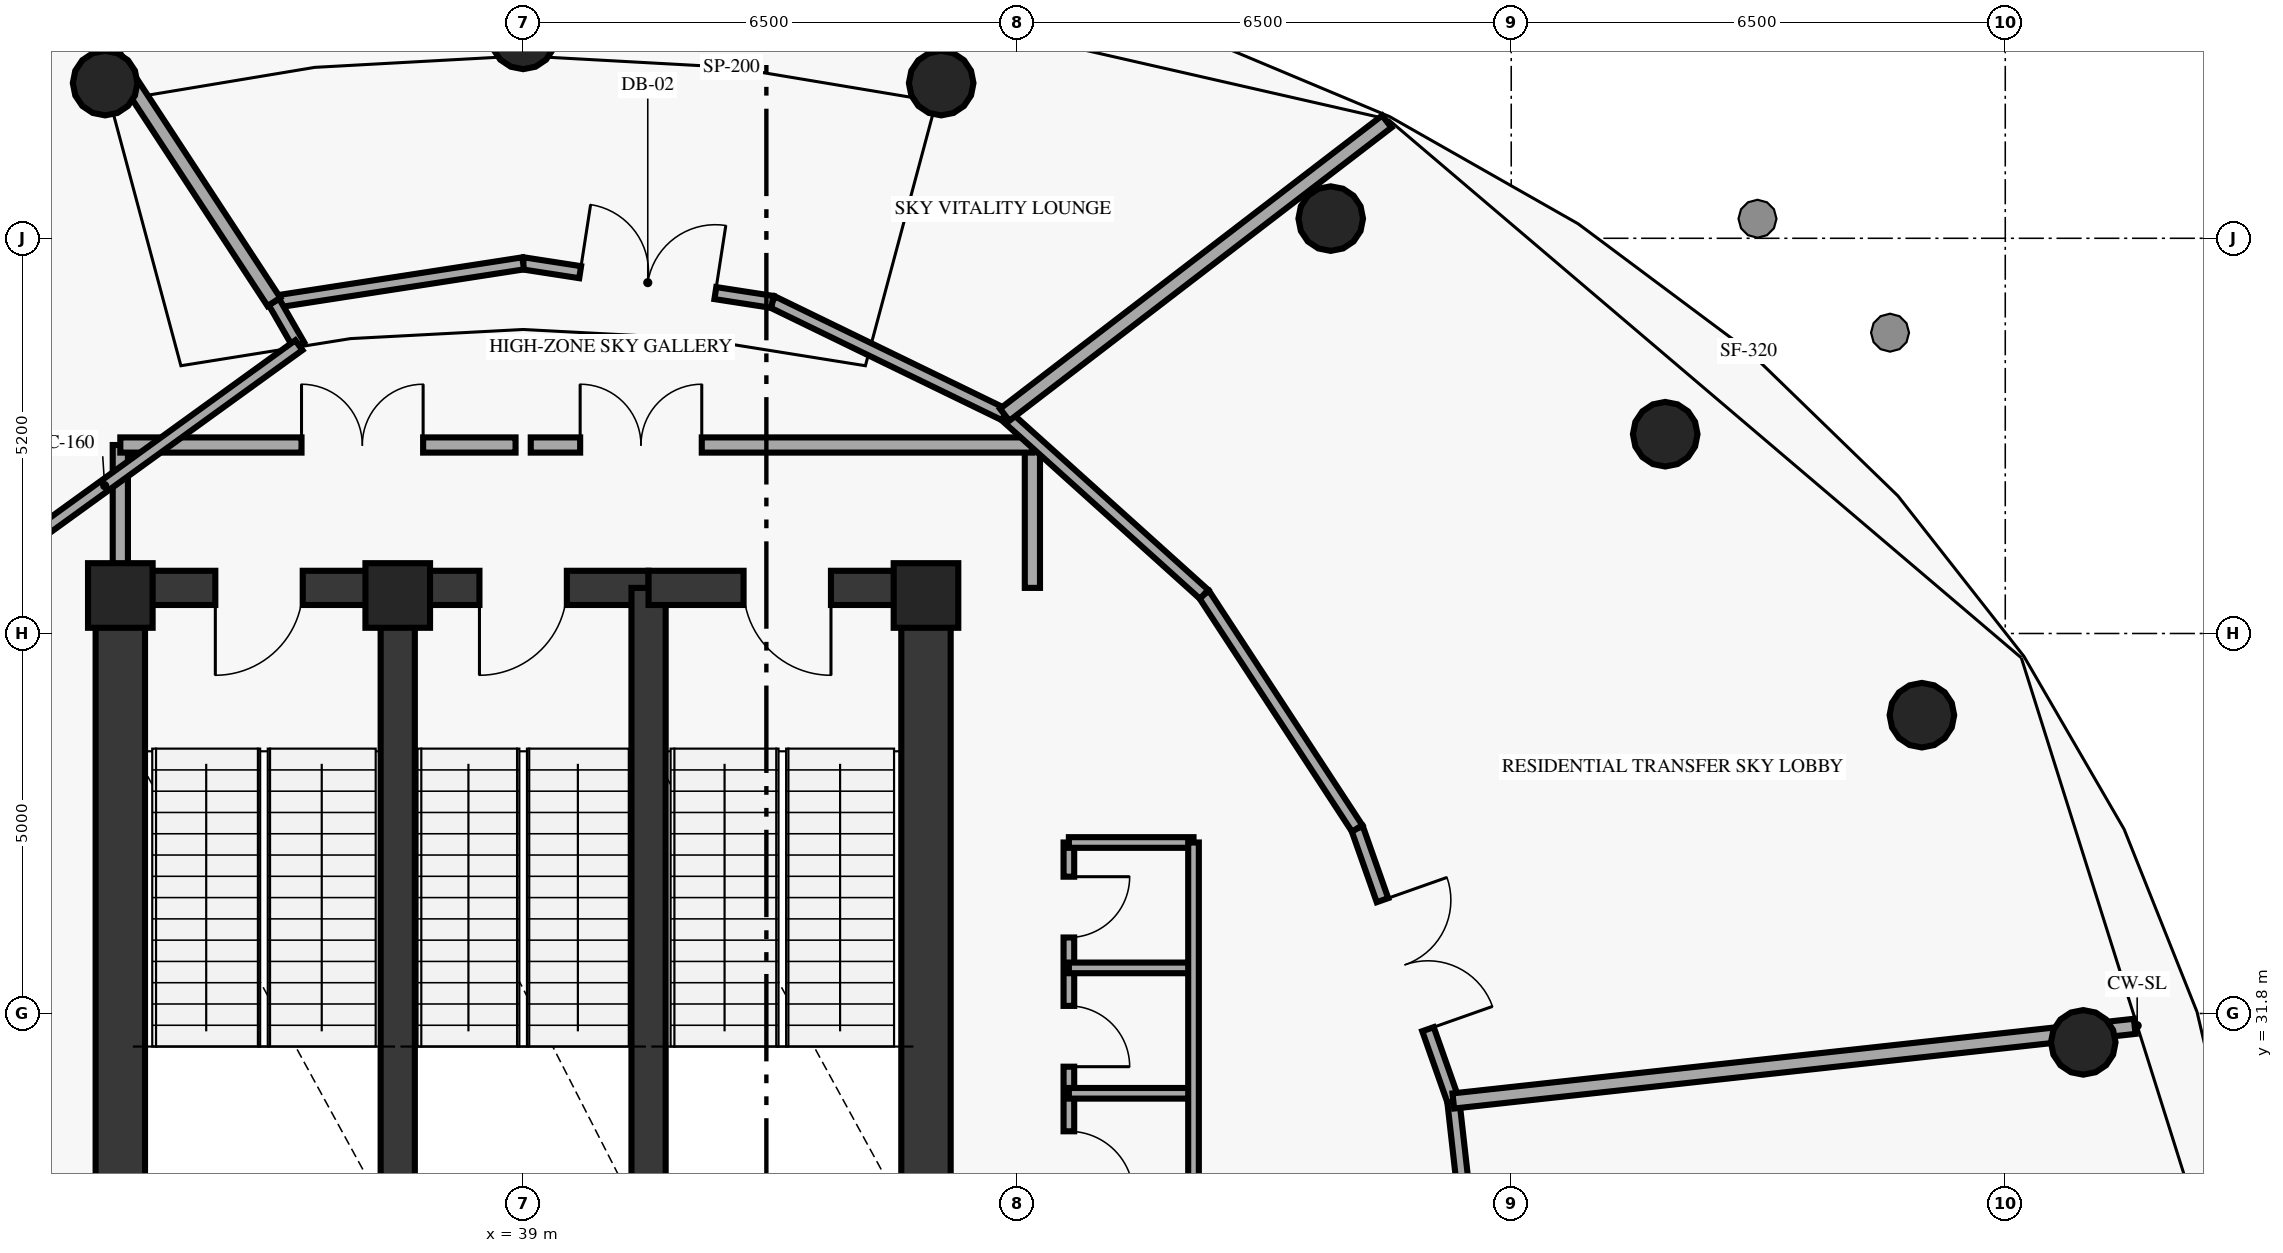
"""IFC4 building model, lengths in metres.
Left out: names, types, materials, properties, quantities, classifications, styles, units other than length and angle.
Written with IfcOpenShell. Run it as: python <this file> out.ifc"""

import sys

from ifc_helpers import new_model, si_unit, direction, frame, frame_2d, origin, origin_2d, place, context, subcontext, project, spatial, rectangle, circle, extrude, element, fill, save


model = new_model("IFC4")
c1 = context("Model", 3, precision=1e-05, world=origin(), true_north=direction((0.0, 1.0)))
c2 = subcontext(c1, "Body", "Model", "MODEL_VIEW")
j1 = project(units=[si_unit("LENGTHUNIT", "METRE"), si_unit("PLANEANGLEUNIT", "RADIAN")], contexts=[c1])
p1 = place(None, origin())
s1 = spatial("IfcSite", under=j1, at=p1, CompositionType="ELEMENT")
p2 = place(p1, origin())
s2 = spatial("IfcBuilding", under=s1, at=p2, CompositionType="ELEMENT")
p3 = place(p2, frame((0.0, 0.0, 203.15)))
s3 = spatial("IfcBuildingStorey", under=s2, at=p3, CompositionType="ELEMENT", Elevation=203.15)
for number, where, z_axis, x_axis in (
    (1, (44.3, 37.3, 0.0), (0.0, 0.0, 1.0), (1.0, 0.0, 0.0)),
    (2, (37.35, 37.3, 0.0), (0.0, 0.0, 1.0), (1.0, 0.0, 0.0)),
    (3, (33.7, 37.3, 0.0), (0.0, 0.0, 1.0), (1.0, 0.0, 0.0)),
):
    element("IfcColumn", number, at=place(p3, frame(where, z_axis=z_axis, x_axis=x_axis)), inside=s3, PredefinedType="PILASTER", context=c2, shape_type="SweptSolid", body=[
        extrude(rectangle(XDim=0.85, YDim=0.85, at=origin_2d()), origin(), (0.0, 0.0, 1.0), 4.76),
    ])
for number, where, z_axis, x_axis in (
    (4, (59.526, 31.42, 0.0), (0.0, 0.0, 1.0), (1.0, 0.0, 0.0)),
    (5, (57.403, 35.725, 0.0), (0.0, 0.0, 1.0), (1.0, 0.0, 0.0)),
    (6, (54.026, 39.422, 0.0), (0.0, 0.0, 1.0), (1.0, 0.0, 0.0)),
    (7, (49.625, 42.259, 0.0), (0.0, 0.0, 1.0), (1.0, 0.0, 0.0)),
    (8, (44.5, 44.042, 0.0), (0.0, 0.0, 1.0), (1.0, 0.0, 0.0)),
    (9, (39.0, 44.65, 0.0), (0.0, 0.0, 1.0), (1.0, 0.0, 0.0)),
    (10, (33.5, 44.042, 0.0), (0.0, 0.0, 1.0), (1.0, 0.0, 0.0)),
):
    element("IfcColumn", number, at=place(p3, frame(where, z_axis=z_axis, x_axis=x_axis)), inside=s3, PredefinedType="COLUMN", context=c2, shape_type="SweptSolid", body=[
        extrude(circle(Radius=0.425, at=origin_2d()), origin(), (0.0, 0.0, 1.0), 4.76),
    ])
for number, where, z_axis, x_axis in (
    (11, (33.7, 29.05, 0.0), (0.0, 0.0, 1.0), (0.0, 1.0, 0.0)),
    (12, (44.3, 29.05, 0.0), (0.0, 0.0, 1.0), (0.0, 1.0, 0.0)),
):
    element("IfcWall", number, at=place(p3, frame(where, z_axis=z_axis, x_axis=x_axis)), inside=s3, PredefinedType="SHEAR", context=c2, shape_type="SweptSolid", body=[
        extrude(rectangle(XDim=8.35, YDim=0.65, at=frame_2d((4.175, 0.0))), origin(), (0.0, 0.0, 1.0), 4.76),
    ])
p4 = place(p3, frame((37.35, 37.4, 0.0), z_axis=(0.0, 0.0, 1.0), x_axis=(-1.0, 0.0, 0.0)))
e13 = element("IfcWall", 13, at=p4, inside=s3, PredefinedType="SHEAR", context=c2, shape_type="SweptSolid", body=[
    extrude(rectangle(XDim=3.65, YDim=0.45, at=frame_2d((1.825, 0.0))), origin(), (0.0, 0.0, 1.0), 4.76),
])
p5 = place(p4, frame((1.25, 0.0, 0.0)))
e14 = element("IfcOpeningElement", 14, at=p5, cuts=e13, PredefinedType="OPENING", context=c2, shape_type="SweptSolid", body=[
    extrude(rectangle(XDim=1.15, YDim=2.15, at=frame_2d((0.575, 1.075))), frame((0.0, 0.235, 0.0), z_axis=(0.0, -1.0, 0.0), x_axis=(1.0, 0.0, 0.0)), (0.0, 0.0, 1.0), 0.47),
])
p6 = place(p3, frame((37.35, 29.05, 0.0), z_axis=(0.0, 0.0, 1.0), x_axis=(0.0, 1.0, 0.0)))
e15 = element("IfcWall", 15, at=p6, inside=s3, PredefinedType="SHEAR", context=c2, shape_type="SweptSolid", body=[
    extrude(rectangle(XDim=8.35, YDim=0.45, at=frame_2d((4.175, 0.0))), origin(), (0.0, 0.0, 1.0), 4.76),
])
p7 = place(p3, frame((40.65, 37.4, 0.0), z_axis=(0.0, 0.0, 1.0), x_axis=(-1.0, 0.0, 0.0)))
e16 = element("IfcWall", 16, at=p7, inside=s3, PredefinedType="SHEAR", context=c2, shape_type="SweptSolid", body=[
    extrude(rectangle(XDim=3.3, YDim=0.45, at=frame_2d((1.65, 0.0))), origin(), (0.0, 0.0, 1.0), 4.76),
])
p8 = place(p7, frame((1.075, 0.0, 0.0)))
e17 = element("IfcOpeningElement", 17, at=p8, cuts=e16, PredefinedType="OPENING", context=c2, shape_type="SweptSolid", body=[
    extrude(rectangle(XDim=1.15, YDim=2.15, at=frame_2d((0.575, 1.075))), frame((0.0, 0.235, 0.0), z_axis=(0.0, -1.0, 0.0), x_axis=(1.0, 0.0, 0.0)), (0.0, 0.0, 1.0), 0.47),
])
p9 = place(p3, frame((40.65, 29.05, 0.0), z_axis=(0.0, 0.0, 1.0), x_axis=(0.0, 1.0, 0.0)))
e18 = element("IfcWall", 18, at=p9, inside=s3, PredefinedType="SHEAR", context=c2, shape_type="SweptSolid", body=[
    extrude(rectangle(XDim=8.35, YDim=0.45, at=frame_2d((4.175, 0.0))), origin(), (0.0, 0.0, 1.0), 4.76),
])
p10 = place(p3, frame((44.3, 37.4, 0.0), z_axis=(0.0, 0.0, 1.0), x_axis=(-1.0, 0.0, 0.0)))
e19 = element("IfcWall", 19, at=p10, inside=s3, PredefinedType="SHEAR", context=c2, shape_type="SweptSolid", body=[
    extrude(rectangle(XDim=3.65, YDim=0.45, at=frame_2d((1.825, 0.0))), origin(), (0.0, 0.0, 1.0), 4.76),
])
p11 = place(p10, frame((1.25, 0.0, 0.0)))
e20 = element("IfcOpeningElement", 20, at=p11, cuts=e19, PredefinedType="OPENING", context=c2, shape_type="SweptSolid", body=[
    extrude(rectangle(XDim=1.15, YDim=2.15, at=frame_2d((0.575, 1.075))), frame((0.0, 0.235, 0.0), z_axis=(0.0, -1.0, 0.0), x_axis=(1.0, 0.0, 0.0)), (0.0, 0.0, 1.0), 0.47),
])
for number, where, z_axis, x_axis in (
    (21, (33.7, 37.4, 0.0), (0.0, 0.0, 1.0), (0.0, 1.0, 0.0)),
    (22, (45.7, 37.4, 0.0), (0.0, 0.0, 1.0), (0.0, 1.0, 0.0)),
):
    element("IfcWall", number, at=place(p3, frame(where, z_axis=z_axis, x_axis=x_axis)), inside=s3, PredefinedType="SOLIDWALL", context=c2, shape_type="SweptSolid", body=[
        extrude(rectangle(XDim=1.88, YDim=0.2, at=frame_2d((0.94, 0.0))), origin(), (0.0, 0.0, 1.0), 4.76),
    ])
p12 = place(p3, frame((38.9, 39.28, 0.0), z_axis=(0.0, 0.0, 1.0), x_axis=(-1.0, 0.0, 0.0)))
e23 = element("IfcWall", 23, at=p12, inside=s3, PredefinedType="SOLIDWALL", context=c2, shape_type="SweptSolid", body=[
    extrude(rectangle(XDim=5.2, YDim=0.2, at=frame_2d((2.6, 0.0))), origin(), (0.0, 0.0, 1.0), 4.76),
])
p13 = place(p12, frame((1.216, 0.0, 0.0)))
e24 = element("IfcOpeningElement", 24, at=p13, cuts=e23, PredefinedType="OPENING", context=c2, shape_type="SweptSolid", body=[
    extrude(rectangle(XDim=1.6, YDim=2.2, at=frame_2d((0.8, 1.1))), frame((0.0, 0.11, 0.0), z_axis=(0.0, -1.0, 0.0), x_axis=(1.0, 0.0, 0.0)), (0.0, 0.0, 1.0), 0.22),
])
p14 = place(p3, frame((45.7, 39.28, 0.0), z_axis=(0.0, 0.0, 1.0), x_axis=(-1.0, 0.0, 0.0)))
e25 = element("IfcWall", 25, at=p14, inside=s3, PredefinedType="SOLIDWALL", context=c2, shape_type="SweptSolid", body=[
    extrude(rectangle(XDim=6.6, YDim=0.2, at=frame_2d((3.3, 0.0))), origin(), (0.0, 0.0, 1.0), 4.76),
])
p15 = place(p14, frame((4.35, 0.0, 0.0)))
e26 = element("IfcOpeningElement", 26, at=p15, cuts=e25, PredefinedType="OPENING", context=c2, shape_type="SweptSolid", body=[
    extrude(rectangle(XDim=1.6, YDim=2.2, at=frame_2d((0.8, 1.1))), frame((0.0, 0.11, 0.0), z_axis=(0.0, -1.0, 0.0), x_axis=(1.0, 0.0, 0.0)), (0.0, 0.0, 1.0), 0.22),
])
p16 = place(p3, frame((46.18, 34.05, 0.0), z_axis=(0.0, 0.0, 1.0), x_axis=(0.0, -1.0, 0.0)))
e27 = element("IfcWall", 27, at=p16, inside=s3, PredefinedType="PARTITIONING", context=c2, shape_type="SweptSolid", body=[
    extrude(rectangle(XDim=5.0, YDim=0.14, at=frame_2d((2.5, 0.0))), origin(), (0.0, 0.0, 1.0), 4.76),
])
p17 = place(p16, frame((3.8, 0.0, 0.0)))
e28 = element("IfcOpeningElement", 28, at=p17, cuts=e27, PredefinedType="OPENING", context=c2, shape_type="SweptSolid", body=[
    extrude(rectangle(XDim=0.85, YDim=2.1, at=frame_2d((0.425, 1.05))), frame((0.0, 0.08, 0.0), z_axis=(0.0, -1.0, 0.0), x_axis=(1.0, 0.0, 0.0)), (0.0, 0.0, 1.0), 0.16),
])
p18 = place(p16, frame((2.15, 0.0, 0.0)))
e29 = element("IfcOpeningElement", 29, at=p18, cuts=e27, PredefinedType="OPENING", context=c2, shape_type="SweptSolid", body=[
    extrude(rectangle(XDim=0.8, YDim=2.05, at=frame_2d((0.4, 1.025))), frame((0.0, 0.08, 0.0), z_axis=(0.0, -1.0, 0.0), x_axis=(1.0, 0.0, 0.0)), (0.0, 0.0, 1.0), 0.16),
])
p19 = place(p16, frame((0.45, 0.0, 0.0)))
e30 = element("IfcOpeningElement", 30, at=p19, cuts=e27, PredefinedType="OPENING", context=c2, shape_type="SweptSolid", body=[
    extrude(rectangle(XDim=0.8, YDim=2.05, at=frame_2d((0.4, 1.025))), frame((0.0, 0.08, 0.0), z_axis=(0.0, -1.0, 0.0), x_axis=(1.0, 0.0, 0.0)), (0.0, 0.0, 1.0), 0.16),
])
for number, where, z_axis, x_axis in (
    (31, (46.18, 30.75, 0.0), (0.0, 0.0, 1.0), (1.0, 0.0, 0.0)),
    (32, (46.18, 32.4, 0.0), (0.0, 0.0, 1.0), (1.0, 0.0, 0.0)),
    (33, (46.18, 34.05, 0.0), (0.0, 0.0, 1.0), (1.0, 0.0, 0.0)),
):
    element("IfcWall", number, at=place(p3, frame(where, z_axis=z_axis, x_axis=x_axis)), inside=s3, PredefinedType="PARTITIONING", context=c2, shape_type="SweptSolid", body=[
        extrude(rectangle(XDim=1.64, YDim=0.14, at=frame_2d((0.82, 0.0))), origin(), (0.0, 0.0, 1.0), 4.76),
    ])
p20 = place(p3, frame((47.82, 29.05, 0.0), z_axis=(0.0, 0.0, 1.0), x_axis=(0.0, 1.0, 0.0)))
e34 = element("IfcWall", 34, at=p20, inside=s3, PredefinedType="PARTITIONING", context=c2, shape_type="SweptSolid", body=[
    extrude(rectangle(XDim=5.0, YDim=0.14, at=frame_2d((2.5, 0.0))), origin(), (0.0, 0.0, 1.0), 4.76),
])
p21 = place(p3, frame((51.67, 26.8, 0.0), z_axis=(0.0, 0.0, 1.0), x_axis=(-0.111510761023, 0.993763226416, 0.0)))
e35 = element("IfcWall", 35, at=p21, inside=s3, PredefinedType="PARTITIONING", context=c2, shape_type="SweptSolid", body=[
    extrude(rectangle(XDim=3.873, YDim=0.16, at=frame_2d((1.937, 0.0))), origin(), (0.0, 0.0, 1.0), 4.76),
])
p22 = place(p3, frame((49.973, 34.235, 0.0), z_axis=(0.0, 0.0, 1.0), x_axis=(0.332685787644, -0.943037733444, 0.0)))
e36 = element("IfcWall", 36, at=p22, inside=s3, PredefinedType="PARTITIONING", context=c2, shape_type="SweptSolid", body=[
    extrude(rectangle(XDim=3.803, YDim=0.16, at=frame_2d((1.901, 0.0))), origin(), (0.0, 0.0, 1.0), 4.76),
])
p23 = place(p22, frame((1.001, 0.0, 0.0)))
e37 = element("IfcOpeningElement", 37, at=p23, cuts=e36, PredefinedType="OPENING", context=c2, shape_type="SweptSolid", body=[
    extrude(rectangle(XDim=1.8, YDim=2.3, at=frame_2d((0.9, 1.15))), frame((0.0, 0.09, 0.0), z_axis=(0.0, -1.0, 0.0), x_axis=(1.0, 0.0, 0.0)), (0.0, 0.0, 1.0), 0.18),
])
p24 = place(p3, frame((49.973, 34.235, 0.0), z_axis=(0.0, 0.0, 1.0), x_axis=(-0.547283325884, 0.836947406477, 0.0)))
e38 = element("IfcWall", 38, at=p24, inside=s3, PredefinedType="PARTITIONING", context=c2, shape_type="SweptSolid", body=[
    extrude(rectangle(XDim=3.68, YDim=0.16, at=frame_2d((1.84, 0.0))), origin(), (0.0, 0.0, 1.0), 4.76),
])
p25 = place(p3, frame((47.959, 37.315, 0.0), z_axis=(0.0, 0.0, 1.0), x_axis=(-0.743094720901, 0.669186248939, 0.0)))
e39 = element("IfcWall", 39, at=p25, inside=s3, PredefinedType="PARTITIONING", context=c2, shape_type="SweptSolid", body=[
    extrude(rectangle(XDim=3.531, YDim=0.16, at=frame_2d((1.766, 0.0))), origin(), (0.0, 0.0, 1.0), 4.76),
])
p26 = place(p3, frame((45.335, 39.678, 0.0), z_axis=(0.0, 0.0, 1.0), x_axis=(-0.899414545514, 0.437096642995, 0.0)))
e40 = element("IfcWall", 40, at=p26, inside=s3, PredefinedType="PARTITIONING", context=c2, shape_type="SweptSolid", body=[
    extrude(rectangle(XDim=3.398, YDim=0.16, at=frame_2d((1.699, 0.0))), origin(), (0.0, 0.0, 1.0), 4.76),
])
p27 = place(p3, frame((39.0, 41.67, 0.0), z_axis=(0.0, 0.0, 1.0), x_axis=(0.988264270775, -0.15275382519, 0.0)))
e41 = element("IfcWall", 41, at=p27, inside=s3, PredefinedType="PARTITIONING", context=c2, shape_type="SweptSolid", body=[
    extrude(rectangle(XDim=3.318, YDim=0.16, at=frame_2d((1.659, 0.0))), origin(), (0.0, 0.0, 1.0), 4.76),
])
p28 = place(p27, frame((0.759, 0.0, 0.0)))
e42 = element("IfcOpeningElement", 42, at=p28, cuts=e41, PredefinedType="OPENING", context=c2, shape_type="SweptSolid", body=[
    extrude(rectangle(XDim=1.8, YDim=2.3, at=frame_2d((0.9, 1.15))), frame((0.0, 0.09, 0.0), z_axis=(0.0, -1.0, 0.0), x_axis=(1.0, 0.0, 0.0)), (0.0, 0.0, 1.0), 0.18),
])
p29 = place(p3, frame((39.0, 41.67, 0.0), z_axis=(0.0, 0.0, 1.0), x_axis=(-0.988264270775, -0.15275382519, 0.0)))
e43 = element("IfcWall", 43, at=p29, inside=s3, PredefinedType="PARTITIONING", context=c2, shape_type="SweptSolid", body=[
    extrude(rectangle(XDim=3.318, YDim=0.16, at=frame_2d((1.659, 0.0))), origin(), (0.0, 0.0, 1.0), 4.76),
])
p30 = place(p3, frame((36.049, 40.593, 0.0), z_axis=(0.0, 0.0, 1.0), x_axis=(-0.498854625265, 0.866685677078, 0.0)))
e44 = element("IfcWall", 44, at=p30, inside=s3, PredefinedType="PARTITIONING", context=c2, shape_type="SweptSolid", body=[
    extrude(rectangle(XDim=0.658, YDim=0.16, at=frame_2d((0.329, 0.0))), origin(), (0.0, 0.0, 1.0), 4.76),
])
p31 = place(p3, frame((51.238, 30.649, 0.0), z_axis=(0.0, 0.0, 1.0), x_axis=(0.994055496631, 0.108874559096, 0.0)))
e45 = element("IfcWall", 45, at=p31, inside=s3, PredefinedType="PARTITIONING", context=c2, shape_type="SweptSolid", body=[
    extrude(rectangle(XDim=8.331, YDim=0.2, at=frame_2d((4.165, 0.0))), origin(), (0.0, 0.0, 1.0), 4.76),
])
p32 = place(p3, frame((59.519, 31.556, 0.0), z_axis=(0.0, 0.0, 1.0), x_axis=(0.994008597854, 0.109301909368, 0.0)))
e46 = element("IfcWall", 46, at=p32, inside=s3, PredefinedType="PARTITIONING", context=c2, shape_type="SweptSolid", body=[
    extrude(rectangle(XDim=0.688, YDim=0.2, at=frame_2d((0.344, 0.0))), origin(), (0.0, 0.0, 1.0), 4.145),
])
p33 = place(p3, frame((45.335, 39.678, 0.0), z_axis=(0.0, 0.0, 1.0), x_axis=(0.793373792652, 0.608734774046, 0.0)))
e47 = element("IfcWall", 47, at=p33, inside=s3, PredefinedType="PARTITIONING", context=c2, shape_type="SweptSolid", body=[
    extrude(rectangle(XDim=6.338, YDim=0.2, at=frame_2d((3.169, 0.0))), origin(), (0.0, 0.0, 1.0), 4.76),
])
p34 = place(p3, frame((35.721, 41.163, 0.0), z_axis=(0.0, 0.0, 1.0), x_axis=(-0.547819348022, 0.836596654268, 0.0)))
e48 = element("IfcWall", 48, at=p34, inside=s3, PredefinedType="PARTITIONING", context=c2, shape_type="SweptSolid", body=[
    extrude(rectangle(XDim=4.384, YDim=0.2, at=frame_2d((2.192, 0.0))), origin(), (0.0, 0.0, 1.0), 4.76),
])
p35 = place(p3, frame((36.049, 40.593, 0.0), z_axis=(0.0, 0.0, 1.0), x_axis=(-0.810271736342, -0.58605436035, 0.0)))
e49 = element("IfcWall", 49, at=p35, inside=s3, PredefinedType="PARTITIONING", context=c2, shape_type="SweptSolid", body=[
    extrude(rectangle(XDim=6.307, YDim=0.16, at=frame_2d((3.153, 0.0))), origin(), (0.0, 0.0, 1.0), 4.76),
])
p36 = place(p5, origin())
e50 = element("IfcDoor", 50, at=p36, inside=s3, OperationType="SINGLE_SWING_RIGHT", PredefinedType="DOOR", context=c2, shape_type="SweptSolid", body=[
    extrude(rectangle(XDim=1.15, YDim=2.15, at=frame_2d((0.575, 1.075))), frame((0.0, 0.025, 0.0), z_axis=(0.0, -1.0, 0.0), x_axis=(1.0, 0.0, 0.0)), (0.0, 0.0, 1.0), 0.05),
])
fill(e14, e50)
p37 = place(p8, origin())
e51 = element("IfcDoor", 51, at=p37, inside=s3, OperationType="SINGLE_SWING_RIGHT", PredefinedType="DOOR", context=c2, shape_type="SweptSolid", body=[
    extrude(rectangle(XDim=1.15, YDim=2.15, at=frame_2d((0.575, 1.075))), frame((0.0, 0.025, 0.0), z_axis=(0.0, -1.0, 0.0), x_axis=(1.0, 0.0, 0.0)), (0.0, 0.0, 1.0), 0.05),
])
fill(e17, e51)
p38 = place(p11, origin())
e52 = element("IfcDoor", 52, at=p38, inside=s3, OperationType="SINGLE_SWING_LEFT", PredefinedType="DOOR", context=c2, shape_type="SweptSolid", body=[
    extrude(rectangle(XDim=1.15, YDim=2.15, at=frame_2d((0.575, 1.075))), frame((0.0, 0.025, 0.0), z_axis=(0.0, -1.0, 0.0), x_axis=(1.0, 0.0, 0.0)), (0.0, 0.0, 1.0), 0.05),
])
fill(e20, e52)
p39 = place(p13, origin())
e53 = element("IfcDoor", 53, at=p39, inside=s3, OperationType="DOUBLE_DOOR_SINGLE_SWING", PredefinedType="DOOR", context=c2, shape_type="SweptSolid", body=[
    extrude(rectangle(XDim=1.6, YDim=2.2, at=frame_2d((0.8, 1.1))), frame((0.0, 0.025, 0.0), z_axis=(0.0, -1.0, 0.0), x_axis=(1.0, 0.0, 0.0)), (0.0, 0.0, 1.0), 0.05),
])
fill(e24, e53)
p40 = place(p15, origin())
e54 = element("IfcDoor", 54, at=p40, inside=s3, OperationType="DOUBLE_DOOR_SINGLE_SWING", PredefinedType="DOOR", context=c2, shape_type="SweptSolid", body=[
    extrude(rectangle(XDim=1.6, YDim=2.2, at=frame_2d((0.8, 1.1))), frame((0.0, 0.025, 0.0), z_axis=(0.0, -1.0, 0.0), x_axis=(1.0, 0.0, 0.0)), (0.0, 0.0, 1.0), 0.05),
])
fill(e26, e54)
p41 = place(p17, origin())
e55 = element("IfcDoor", 55, at=p41, inside=s3, OperationType="SINGLE_SWING_RIGHT", PredefinedType="DOOR", context=c2, shape_type="SweptSolid", body=[
    extrude(rectangle(XDim=0.85, YDim=2.1, at=frame_2d((0.425, 1.05))), frame((0.0, 0.025, 0.0), z_axis=(0.0, -1.0, 0.0), x_axis=(1.0, 0.0, 0.0)), (0.0, 0.0, 1.0), 0.05),
])
fill(e28, e55)
p42 = place(p18, origin())
e56 = element("IfcDoor", 56, at=p42, inside=s3, OperationType="SINGLE_SWING_RIGHT", PredefinedType="DOOR", context=c2, shape_type="SweptSolid", body=[
    extrude(rectangle(XDim=0.8, YDim=2.05, at=frame_2d((0.4, 1.025))), frame((0.0, 0.025, 0.0), z_axis=(0.0, -1.0, 0.0), x_axis=(1.0, 0.0, 0.0)), (0.0, 0.0, 1.0), 0.05),
])
fill(e29, e56)
p43 = place(p19, origin())
e57 = element("IfcDoor", 57, at=p43, inside=s3, OperationType="SINGLE_SWING_LEFT", PredefinedType="DOOR", context=c2, shape_type="SweptSolid", body=[
    extrude(rectangle(XDim=0.8, YDim=2.05, at=frame_2d((0.4, 1.025))), frame((0.0, 0.025, 0.0), z_axis=(0.0, -1.0, 0.0), x_axis=(1.0, 0.0, 0.0)), (0.0, 0.0, 1.0), 0.05),
])
fill(e30, e57)
p44 = place(p23, origin())
e58 = element("IfcDoor", 58, at=p44, inside=s3, OperationType="DOUBLE_DOOR_SINGLE_SWING", PredefinedType="DOOR", context=c2, shape_type="SweptSolid", body=[
    extrude(rectangle(XDim=1.8, YDim=2.3, at=frame_2d((0.9, 1.15))), frame((0.0, 0.025, 0.0), z_axis=(0.0, -1.0, 0.0), x_axis=(1.0, 0.0, 0.0)), (0.0, 0.0, 1.0), 0.05),
])
fill(e37, e58)
p45 = place(p28, origin())
e59 = element("IfcDoor", 59, at=p45, inside=s3, OperationType="DOUBLE_DOOR_SINGLE_SWING", PredefinedType="DOOR", context=c2, shape_type="SweptSolid", body=[
    extrude(rectangle(XDim=1.8, YDim=2.3, at=frame_2d((0.9, 1.15))), frame((0.0, 0.025, 0.0), z_axis=(0.0, -1.0, 0.0), x_axis=(1.0, 0.0, 0.0)), (0.0, 0.0, 1.0), 0.05),
])
fill(e42, e59)
save(model, sys.argv[1])
